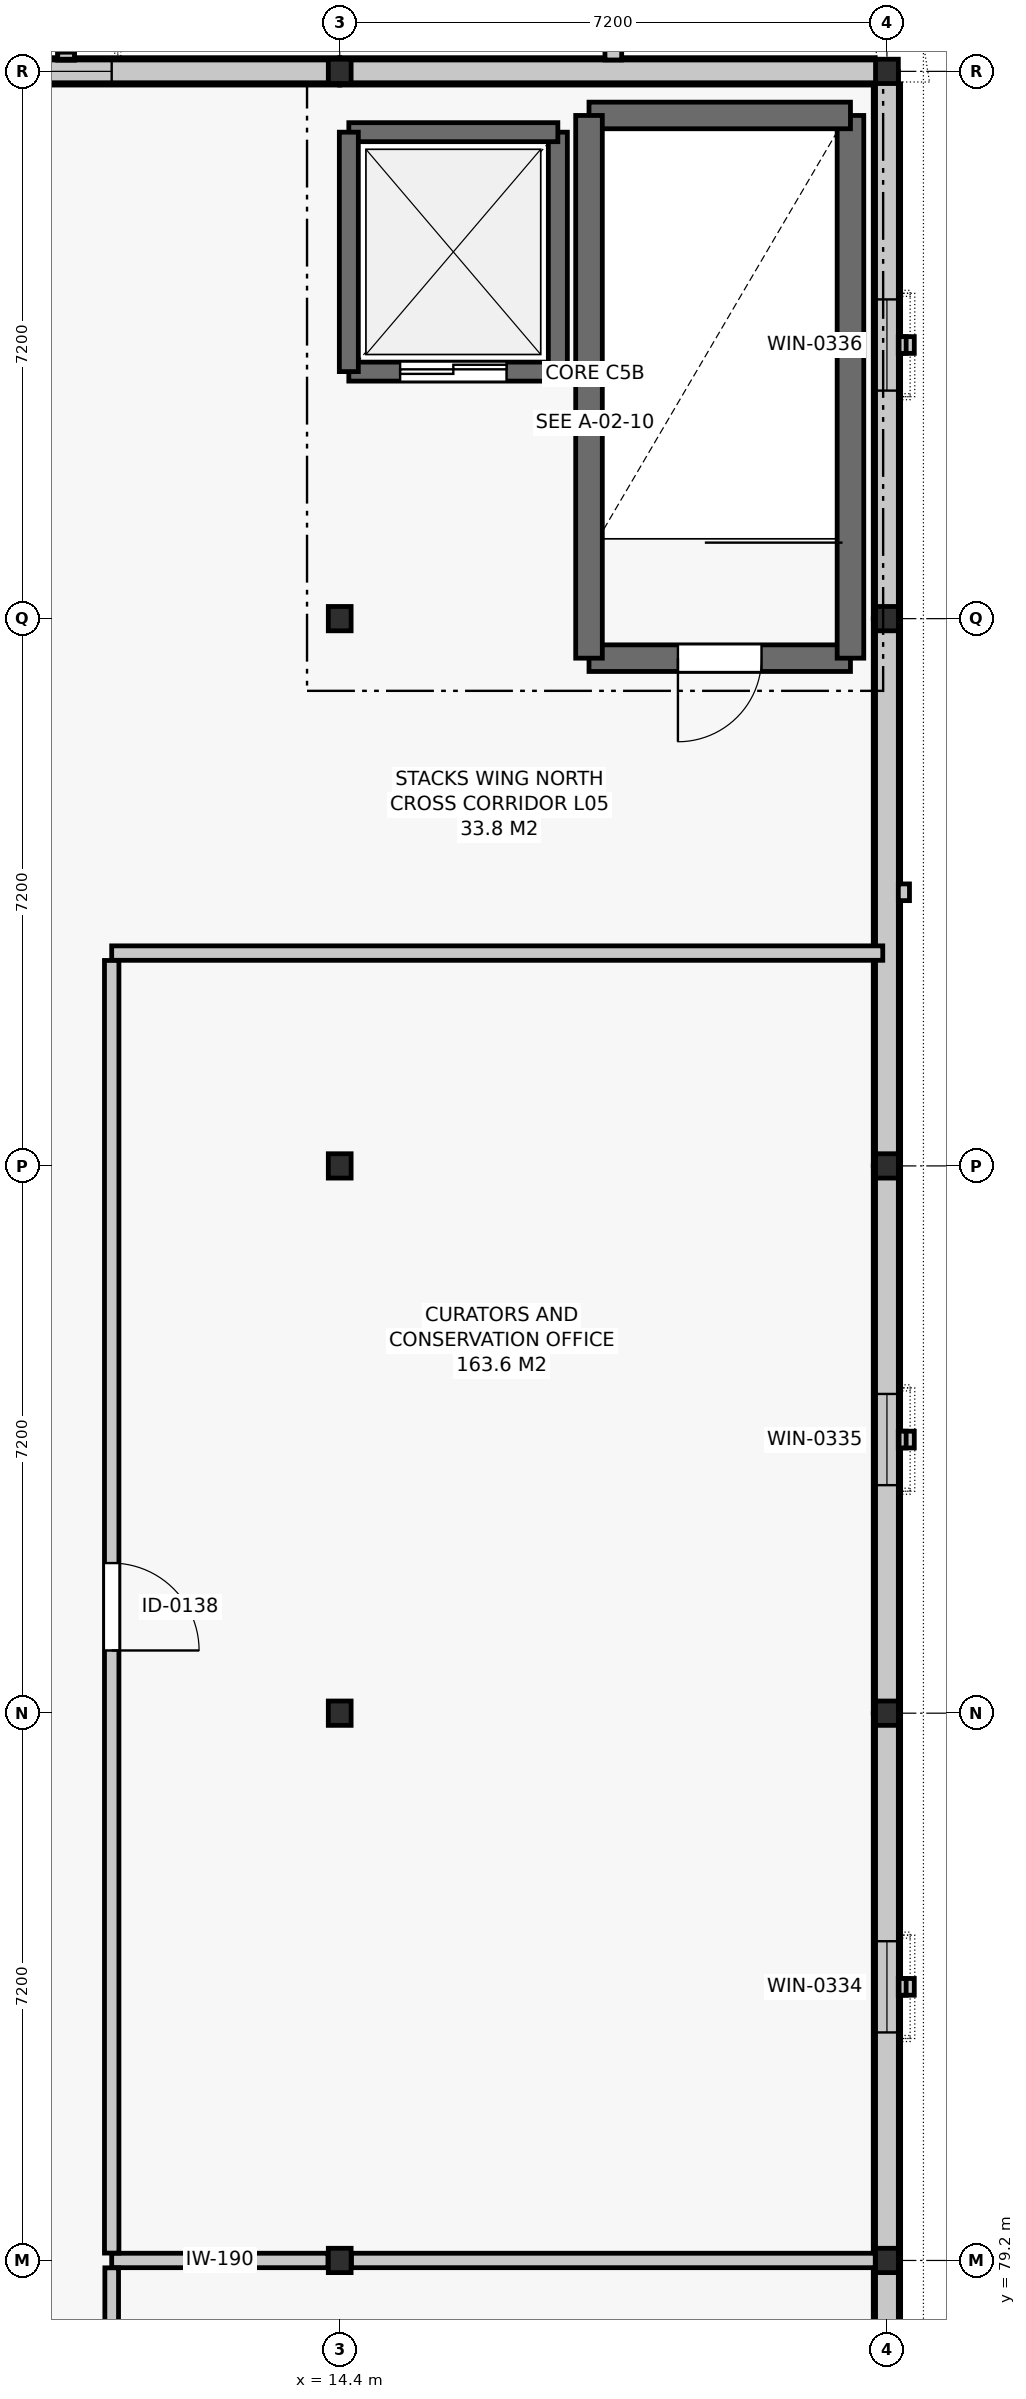
"""IFC4 building model, lengths in metres.
Left out: names, types, materials, properties, quantities, classifications, styles, units other than length and angle.
Written with IfcOpenShell. Run it as: python <this file> out.ifc"""

import sys

from ifc_helpers import new_model, si_unit, direction, frame, frame_2d, origin, origin_2d, place, context, subcontext, project, spatial, rectangle, i_section, extrude, element, fill, save


model = new_model("IFC4")
c1 = context("Model", 3, precision=1e-05, world=origin(), true_north=direction((0.0, 1.0)))
c2 = subcontext(c1, "Body", "Model", "MODEL_VIEW")
j1 = project(units=[si_unit("LENGTHUNIT", "METRE"), si_unit("PLANEANGLEUNIT", "RADIAN")], contexts=[c1])
p1 = place(None, origin())
s1 = spatial("IfcSite", under=j1, at=p1, CompositionType="ELEMENT")
p2 = place(p1, origin())
s2 = spatial("IfcBuilding", under=s1, at=p2, CompositionType="ELEMENT")
p3 = place(p2, frame((0.0, 0.0, 22.8)))
s3 = spatial("IfcBuildingStorey", under=s2, at=p3, CompositionType="ELEMENT", Elevation=22.8)
for number, where, z_axis, x_axis in (
    (1, (14.4, 79.2, 0.0), (0.0, 0.0, 1.0), (1.0, 0.0, 0.0)),
    (2, (14.4, 86.4, 0.0), (0.0, 0.0, 1.0), (1.0, 0.0, 0.0)),
    (3, (14.4, 93.6, 0.0), (0.0, 0.0, 1.0), (1.0, 0.0, 0.0)),
    (4, (14.4, 100.8, 0.0), (0.0, 0.0, 1.0), (1.0, 0.0, 0.0)),
    (5, (14.4, 108.0, 0.0), (0.0, 0.0, 1.0), (1.0, 0.0, 0.0)),
    (6, (21.6, 79.2, 0.0), (0.0, 0.0, 1.0), (1.0, 0.0, 0.0)),
    (7, (21.6, 86.4, 0.0), (0.0, 0.0, 1.0), (1.0, 0.0, 0.0)),
    (8, (21.6, 93.6, 0.0), (0.0, 0.0, 1.0), (1.0, 0.0, 0.0)),
    (9, (21.6, 100.8, 0.0), (0.0, 0.0, 1.0), (1.0, 0.0, 0.0)),
    (10, (21.6, 108.0, 0.0), (0.0, 0.0, 1.0), (1.0, 0.0, 0.0)),
):
    element("IfcColumn", number, at=place(p3, frame(where, z_axis=z_axis, x_axis=x_axis)), inside=s3, PredefinedType="COLUMN", context=c2, shape_type="SweptSolid", body=[
        extrude(i_section(OverallWidth=0.3, OverallDepth=0.32, WebThickness=0.011, FlangeThickness=0.021, FilletRadius=0.027, at=origin_2d()), origin(), (0.0, 0.0, 1.0), 4.2),
    ])
p4 = place(p3, frame((21.6, 72.0, 0.0), z_axis=(0.0, 0.0, 1.0), x_axis=(0.0, 1.0, 0.0)))
e11 = element("IfcWall", 11, at=p4, inside=s3, PredefinedType="SOLIDWALL", context=c2, shape_type="SweptSolid", body=[
    extrude(rectangle(XDim=7.2, YDim=0.36, at=frame_2d((3.6, 0.0))), origin(), (0.0, 0.0, 1.0), 3.24),
])
p5 = place(p4, frame((3.0, 0.0, 0.95)))
e12 = element("IfcOpeningElement", 12, at=p5, cuts=e11, PredefinedType="OPENING", context=c2, shape_type="SweptSolid", body=[
    extrude(rectangle(XDim=1.2, YDim=2.15, at=frame_2d((0.6, 1.075))), frame((0.0, 0.192, 0.0), z_axis=(0.0, -1.0, 0.0), x_axis=(1.0, 0.0, 0.0)), (0.0, 0.0, 1.0), 0.384),
])
p6 = place(p3, frame((21.6, 79.2, 0.0), z_axis=(0.0, 0.0, 1.0), x_axis=(0.0, 1.0, 0.0)))
e13 = element("IfcWall", 13, at=p6, inside=s3, PredefinedType="SOLIDWALL", context=c2, shape_type="SweptSolid", body=[
    extrude(rectangle(XDim=7.2, YDim=0.36, at=frame_2d((3.6, 0.0))), origin(), (0.0, 0.0, 1.0), 3.24),
])
p7 = place(p6, frame((3.0, 0.0, 0.95)))
e14 = element("IfcOpeningElement", 14, at=p7, cuts=e13, PredefinedType="OPENING", context=c2, shape_type="SweptSolid", body=[
    extrude(rectangle(XDim=1.2, YDim=2.15, at=frame_2d((0.6, 1.075))), frame((0.0, 0.192, 0.0), z_axis=(0.0, -1.0, 0.0), x_axis=(1.0, 0.0, 0.0)), (0.0, 0.0, 1.0), 0.384),
])
p8 = place(p3, frame((21.6, 86.4, 0.0), z_axis=(0.0, 0.0, 1.0), x_axis=(0.0, 1.0, 0.0)))
e15 = element("IfcWall", 15, at=p8, inside=s3, PredefinedType="SOLIDWALL", context=c2, shape_type="SweptSolid", body=[
    extrude(rectangle(XDim=7.2, YDim=0.36, at=frame_2d((3.6, 0.0))), origin(), (0.0, 0.0, 1.0), 3.24),
])
p9 = place(p8, frame((3.0, 0.0, 0.95)))
e16 = element("IfcOpeningElement", 16, at=p9, cuts=e15, PredefinedType="OPENING", context=c2, shape_type="SweptSolid", body=[
    extrude(rectangle(XDim=1.2, YDim=2.15, at=frame_2d((0.6, 1.075))), frame((0.0, 0.192, 0.0), z_axis=(0.0, -1.0, 0.0), x_axis=(1.0, 0.0, 0.0)), (0.0, 0.0, 1.0), 0.384),
])
p10 = place(p3, frame((21.6, 93.6, 0.0), z_axis=(0.0, 0.0, 1.0), x_axis=(0.0, 1.0, 0.0)))
e17 = element("IfcWall", 17, at=p10, inside=s3, PredefinedType="SOLIDWALL", context=c2, shape_type="SweptSolid", body=[
    extrude(rectangle(XDim=7.2, YDim=0.36, at=frame_2d((3.6, 0.0))), origin(), (0.0, 0.0, 1.0), 3.24),
])
p11 = place(p3, frame((21.6, 100.8, 0.0), z_axis=(0.0, 0.0, 1.0), x_axis=(0.0, 1.0, 0.0)))
e18 = element("IfcWall", 18, at=p11, inside=s3, PredefinedType="SOLIDWALL", context=c2, shape_type="SweptSolid", body=[
    extrude(rectangle(XDim=7.036, YDim=0.36, at=frame_2d((3.518, 0.0))), origin(), (0.0, 0.0, 1.0), 3.24),
])
p12 = place(p11, frame((3.0, 0.0, 0.95)))
e19 = element("IfcOpeningElement", 19, at=p12, cuts=e18, PredefinedType="OPENING", context=c2, shape_type="SweptSolid", body=[
    extrude(rectangle(XDim=1.2, YDim=2.15, at=frame_2d((0.6, 1.075))), frame((0.0, 0.192, 0.0), z_axis=(0.0, -1.0, 0.0), x_axis=(1.0, 0.0, 0.0)), (0.0, 0.0, 1.0), 0.384),
])
p13 = place(p3, frame((21.446, 108.0, 0.0), z_axis=(0.0, 0.0, 1.0), x_axis=(-1.0, 0.0, 0.0)))
e20 = element("IfcWall", 20, at=p13, inside=s3, PredefinedType="SOLIDWALL", context=c2, shape_type="SweptSolid", body=[
    extrude(rectangle(XDim=7.046, YDim=0.36, at=frame_2d((3.523, 0.0))), origin(), (0.0, 0.0, 1.0), 3.24),
])
p14 = place(p3, frame((14.4, 108.0, 0.0), z_axis=(0.0, 0.0, 1.0), x_axis=(-1.0, 0.0, 0.0)))
e21 = element("IfcWall", 21, at=p14, inside=s3, PredefinedType="SOLIDWALL", context=c2, shape_type="SweptSolid", body=[
    extrude(rectangle(XDim=7.2, YDim=0.36, at=frame_2d((3.6, 0.0))), origin(), (0.0, 0.0, 1.0), 3.24),
])
p15 = place(p14, frame((3.0, 0.0, 0.95)))
e22 = element("IfcOpeningElement", 22, at=p15, cuts=e21, PredefinedType="OPENING", context=c2, shape_type="SweptSolid", body=[
    extrude(rectangle(XDim=1.2, YDim=2.15, at=frame_2d((0.6, 1.075))), frame((0.0, 0.192, 0.0), z_axis=(0.0, -1.0, 0.0), x_axis=(1.0, 0.0, 0.0)), (0.0, 0.0, 1.0), 0.384),
])
p16 = place(p3, frame((21.6, 43.2, 4.2), z_axis=(0.0, 0.0, 1.0), x_axis=(0.0, 1.0, 0.0)))
e23 = element("IfcWall", 23, at=p16, inside=s3, PredefinedType="PARAPET", context=c2, shape_type="SweptSolid", body=[
    extrude(rectangle(XDim=64.8, YDim=0.3, at=frame_2d((32.4, 0.0))), origin(), (0.0, 0.0, 1.0), 1.2),
])
p17 = place(p3, frame((21.6, 108.0, 4.2), z_axis=(0.0, 0.0, 1.0), x_axis=(-1.0, 0.0, 0.0)))
e24 = element("IfcWall", 24, at=p17, inside=s3, PredefinedType="PARAPET", context=c2, shape_type="SweptSolid", body=[
    extrude(rectangle(XDim=21.6, YDim=0.3, at=frame_2d((10.8, 0.0))), origin(), (0.0, 0.0, 1.0), 1.2),
])
p18 = place(p3, frame((17.68, 100.28, 0.0), z_axis=(0.0, 0.0, 1.0), x_axis=(1.0, 0.0, 0.0)))
e25 = element("IfcWall", 25, at=p18, inside=s3, PredefinedType="SHEAR", context=c2, shape_type="SweptSolid", body=[
    extrude(rectangle(XDim=3.44, YDim=0.35, at=frame_2d((1.72, 0.0))), origin(), (0.0, 0.0, 1.0), 3.96),
])
p19 = place(p18, frame((1.17, 0.0, 0.0)))
e26 = element("IfcOpeningElement", 26, at=p19, cuts=e25, PredefinedType="OPENING", context=c2, shape_type="SweptSolid", body=[
    extrude(rectangle(XDim=1.1, YDim=2.15, at=frame_2d((0.55, 1.075))), frame((0.0, 0.187, 0.0), z_axis=(0.0, -1.0, 0.0), x_axis=(1.0, 0.0, 0.0)), (0.0, 0.0, 1.0), 0.374),
])
p20 = place(p3, frame((21.12, 100.28, 0.0), z_axis=(0.0, 0.0, 1.0), x_axis=(0.0, 1.0, 0.0)))
e27 = element("IfcWall", 27, at=p20, inside=s3, PredefinedType="SHEAR", context=c2, shape_type="SweptSolid", body=[
    extrude(rectangle(XDim=7.14, YDim=0.35, at=frame_2d((3.57, 0.0))), origin(), (0.0, 0.0, 1.0), 3.96),
])
p21 = place(p3, frame((21.12, 107.42, 0.0), z_axis=(0.0, 0.0, 1.0), x_axis=(-1.0, 0.0, 0.0)))
e28 = element("IfcWall", 28, at=p21, inside=s3, PredefinedType="SHEAR", context=c2, shape_type="SweptSolid", body=[
    extrude(rectangle(XDim=3.44, YDim=0.35, at=frame_2d((1.72, 0.0))), origin(), (0.0, 0.0, 1.0), 3.96),
])
p22 = place(p3, frame((17.68, 107.42, 0.0), z_axis=(0.0, 0.0, 1.0), x_axis=(0.0, -1.0, 0.0)))
e29 = element("IfcWall", 29, at=p22, inside=s3, PredefinedType="SHEAR", context=c2, shape_type="SweptSolid", body=[
    extrude(rectangle(XDim=7.14, YDim=0.35, at=frame_2d((3.57, 0.0))), origin(), (0.0, 0.0, 1.0), 3.96),
])
p23 = place(p3, frame((14.52, 104.05, 0.0), z_axis=(0.0, 0.0, 1.0), x_axis=(1.0, 0.0, 0.0)))
e30 = element("IfcWall", 30, at=p23, inside=s3, PredefinedType="SHEAR", context=c2, shape_type="SweptSolid", body=[
    extrude(rectangle(XDim=2.75, YDim=0.25, at=frame_2d((1.375, 0.0))), origin(), (0.0, 0.0, 1.0), 3.96),
])
p24 = place(p23, frame((0.675, 0.0, 0.0)))
e31 = element("IfcOpeningElement", 31, at=p24, cuts=e30, PredefinedType="OPENING", context=c2, shape_type="SweptSolid", body=[
    extrude(rectangle(XDim=1.4, YDim=2.2, at=frame_2d((0.7, 1.1))), frame((0.0, 0.137, 0.0), z_axis=(0.0, -1.0, 0.0), x_axis=(1.0, 0.0, 0.0)), (0.0, 0.0, 1.0), 0.274),
])
p25 = place(p3, frame((17.27, 104.05, 0.0), z_axis=(0.0, 0.0, 1.0), x_axis=(0.0, 1.0, 0.0)))
e32 = element("IfcWall", 32, at=p25, inside=s3, PredefinedType="SHEAR", context=c2, shape_type="SweptSolid", body=[
    extrude(rectangle(XDim=3.15, YDim=0.25, at=frame_2d((1.575, 0.0))), origin(), (0.0, 0.0, 1.0), 3.96),
])
p26 = place(p3, frame((17.27, 107.2, 0.0), z_axis=(0.0, 0.0, 1.0), x_axis=(-1.0, 0.0, 0.0)))
e33 = element("IfcWall", 33, at=p26, inside=s3, PredefinedType="SHEAR", context=c2, shape_type="SweptSolid", body=[
    extrude(rectangle(XDim=2.75, YDim=0.25, at=frame_2d((1.375, 0.0))), origin(), (0.0, 0.0, 1.0), 3.96),
])
p27 = place(p3, frame((14.52, 107.2, 0.0), z_axis=(0.0, 0.0, 1.0), x_axis=(0.0, -1.0, 0.0)))
e34 = element("IfcWall", 34, at=p27, inside=s3, PredefinedType="SHEAR", context=c2, shape_type="SweptSolid", body=[
    extrude(rectangle(XDim=3.15, YDim=0.25, at=frame_2d((1.575, 0.0))), origin(), (0.0, 0.0, 1.0), 3.96),
])
p28 = place(p3, frame((11.4, 79.2, 0.0), z_axis=(0.0, 0.0, 1.0), x_axis=(1.0, 0.0, 0.0)))
e35 = element("IfcWall", 35, at=p28, inside=s3, PredefinedType="PARTITIONING", context=c2, shape_type="SweptSolid", body=[
    extrude(rectangle(XDim=2.846, YDim=0.19, at=frame_2d((1.423, 0.0))), origin(), (0.0, 0.0, 1.0), 3.395),
])
p29 = place(p3, frame((14.554, 79.2, 0.0), z_axis=(0.0, 0.0, 1.0), x_axis=(1.0, 0.0, 0.0)))
e36 = element("IfcWall", 36, at=p29, inside=s3, PredefinedType="PARTITIONING", context=c2, shape_type="SweptSolid", body=[
    extrude(rectangle(XDim=6.892, YDim=0.19, at=frame_2d((3.446, 0.0))), origin(), (0.0, 0.0, 1.0), 3.395),
])
p30 = place(p3, frame((11.4, 96.4, 0.0), z_axis=(0.0, 0.0, 1.0), x_axis=(1.0, 0.0, 0.0)))
e37 = element("IfcWall", 37, at=p30, inside=s3, PredefinedType="PARTITIONING", context=c2, shape_type="SweptSolid", body=[
    extrude(rectangle(XDim=10.145, YDim=0.19, at=frame_2d((5.073, 0.0))), origin(), (0.0, 0.0, 1.0), 3.345),
])
p31 = place(p3, frame((11.4, 79.297, 0.0), z_axis=(0.0, 0.0, 1.0), x_axis=(0.0, 1.0, 0.0)))
e38 = element("IfcWall", 38, at=p31, inside=s3, PredefinedType="PARTITIONING", context=c2, shape_type="SweptSolid", body=[
    extrude(rectangle(XDim=17.006, YDim=0.19, at=frame_2d((8.503, 0.0))), origin(), (0.0, 0.0, 1.0), 3.395),
])
p32 = place(p31, frame((7.928, 0.0, 0.0)))
e39 = element("IfcOpeningElement", 39, at=p32, cuts=e38, PredefinedType="OPENING", context=c2, shape_type="SweptSolid", body=[
    extrude(rectangle(XDim=1.15, YDim=2.2, at=frame_2d((0.575, 1.1))), frame((0.0, 0.107, 0.0), z_axis=(0.0, -1.0, 0.0), x_axis=(1.0, 0.0, 0.0)), (0.0, 0.0, 1.0), 0.214),
])
p33 = place(p3, frame((11.4, 43.255, 0.0), z_axis=(0.0, 0.0, 1.0), x_axis=(0.0, 1.0, 0.0)))
e40 = element("IfcWall", 40, at=p33, inside=s3, PredefinedType="PARTITIONING", context=c2, shape_type="SweptSolid", body=[
    extrude(rectangle(XDim=35.848, YDim=0.18, at=frame_2d((17.924, 0.0))), origin(), (0.0, 0.0, 1.0), 3.345),
])
p34 = place(p33, frame((17.024, 0.0, 0.0)))
e41 = element("IfcOpeningElement", 41, at=p34, cuts=e40, PredefinedType="OPENING", context=c2, shape_type="SweptSolid", body=[
    extrude(rectangle(XDim=1.8, YDim=2.35, at=frame_2d((0.9, 1.175))), frame((0.0, 0.102, 0.0), z_axis=(0.0, -1.0, 0.0), x_axis=(1.0, 0.0, 0.0)), (0.0, 0.0, 1.0), 0.204),
])
p35 = place(p7, origin())
e42 = element("IfcWindow", 42, at=p35, inside=s3, PartitioningType="SINGLE_PANEL", PredefinedType="WINDOW", context=c2, shape_type="SweptSolid", body=[
    extrude(rectangle(XDim=1.2, YDim=2.15, at=frame_2d((0.6, 1.075))), frame((0.0, 0.03, 0.0), z_axis=(0.0, -1.0, 0.0), x_axis=(1.0, 0.0, 0.0)), (0.0, 0.0, 1.0), 0.06),
])
fill(e14, e42)
p36 = place(p9, origin())
e43 = element("IfcWindow", 43, at=p36, inside=s3, PartitioningType="SINGLE_PANEL", PredefinedType="WINDOW", context=c2, shape_type="SweptSolid", body=[
    extrude(rectangle(XDim=1.2, YDim=2.15, at=frame_2d((0.6, 1.075))), frame((0.0, 0.03, 0.0), z_axis=(0.0, -1.0, 0.0), x_axis=(1.0, 0.0, 0.0)), (0.0, 0.0, 1.0), 0.06),
])
fill(e16, e43)
p37 = place(p12, origin())
e44 = element("IfcWindow", 44, at=p37, inside=s3, PartitioningType="SINGLE_PANEL", PredefinedType="WINDOW", context=c2, shape_type="SweptSolid", body=[
    extrude(rectangle(XDim=1.2, YDim=2.15, at=frame_2d((0.6, 1.075))), frame((0.0, 0.03, 0.0), z_axis=(0.0, -1.0, 0.0), x_axis=(1.0, 0.0, 0.0)), (0.0, 0.0, 1.0), 0.06),
])
fill(e19, e44)
p38 = place(p15, origin())
e45 = element("IfcWindow", 45, at=p38, inside=s3, PartitioningType="SINGLE_PANEL", PredefinedType="WINDOW", context=c2, shape_type="SweptSolid", body=[
    extrude(rectangle(XDim=1.2, YDim=2.15, at=frame_2d((0.6, 1.075))), frame((0.0, 0.03, 0.0), z_axis=(0.0, -1.0, 0.0), x_axis=(1.0, 0.0, 0.0)), (0.0, 0.0, 1.0), 0.06),
])
fill(e22, e45)
p39 = place(p19, frame((1.1, 0.0, 0.0), z_axis=(0.0, 0.0, 1.0), x_axis=(-1.0, 0.0, 0.0)))
e46 = element("IfcDoor", 46, at=p39, inside=s3, OperationType="SINGLE_SWING_RIGHT", PredefinedType="DOOR", context=c2, shape_type="SweptSolid", body=[
    extrude(rectangle(XDim=1.1, YDim=2.15, at=frame_2d((0.55, 1.075))), frame((0.0, 0.025, 0.0), z_axis=(0.0, -1.0, 0.0), x_axis=(1.0, 0.0, 0.0)), (0.0, 0.0, 1.0), 0.05),
])
fill(e26, e46)
p40 = place(p24, origin())
e47 = element("IfcDoor", 47, at=p40, inside=s3, OperationType="DOUBLE_DOOR_SLIDING", PredefinedType="DOOR", context=c2, shape_type="SweptSolid", body=[
    extrude(rectangle(XDim=1.4, YDim=2.2, at=frame_2d((0.7, 1.1))), frame((0.0, 0.025, 0.0), z_axis=(0.0, -1.0, 0.0), x_axis=(1.0, 0.0, 0.0)), (0.0, 0.0, 1.0), 0.05),
])
fill(e31, e47)
p41 = place(p32, frame((1.15, 0.0, 0.0), z_axis=(0.0, 0.0, 1.0), x_axis=(-1.0, 0.0, 0.0)))
e48 = element("IfcDoor", 48, at=p41, inside=s3, OperationType="SINGLE_SWING_RIGHT", PredefinedType="DOOR", context=c2, shape_type="SweptSolid", body=[
    extrude(rectangle(XDim=1.15, YDim=2.2, at=frame_2d((0.575, 1.1))), frame((0.0, 0.025, 0.0), z_axis=(0.0, -1.0, 0.0), x_axis=(1.0, 0.0, 0.0)), (0.0, 0.0, 1.0), 0.05),
])
fill(e39, e48)
save(model, sys.argv[1])
